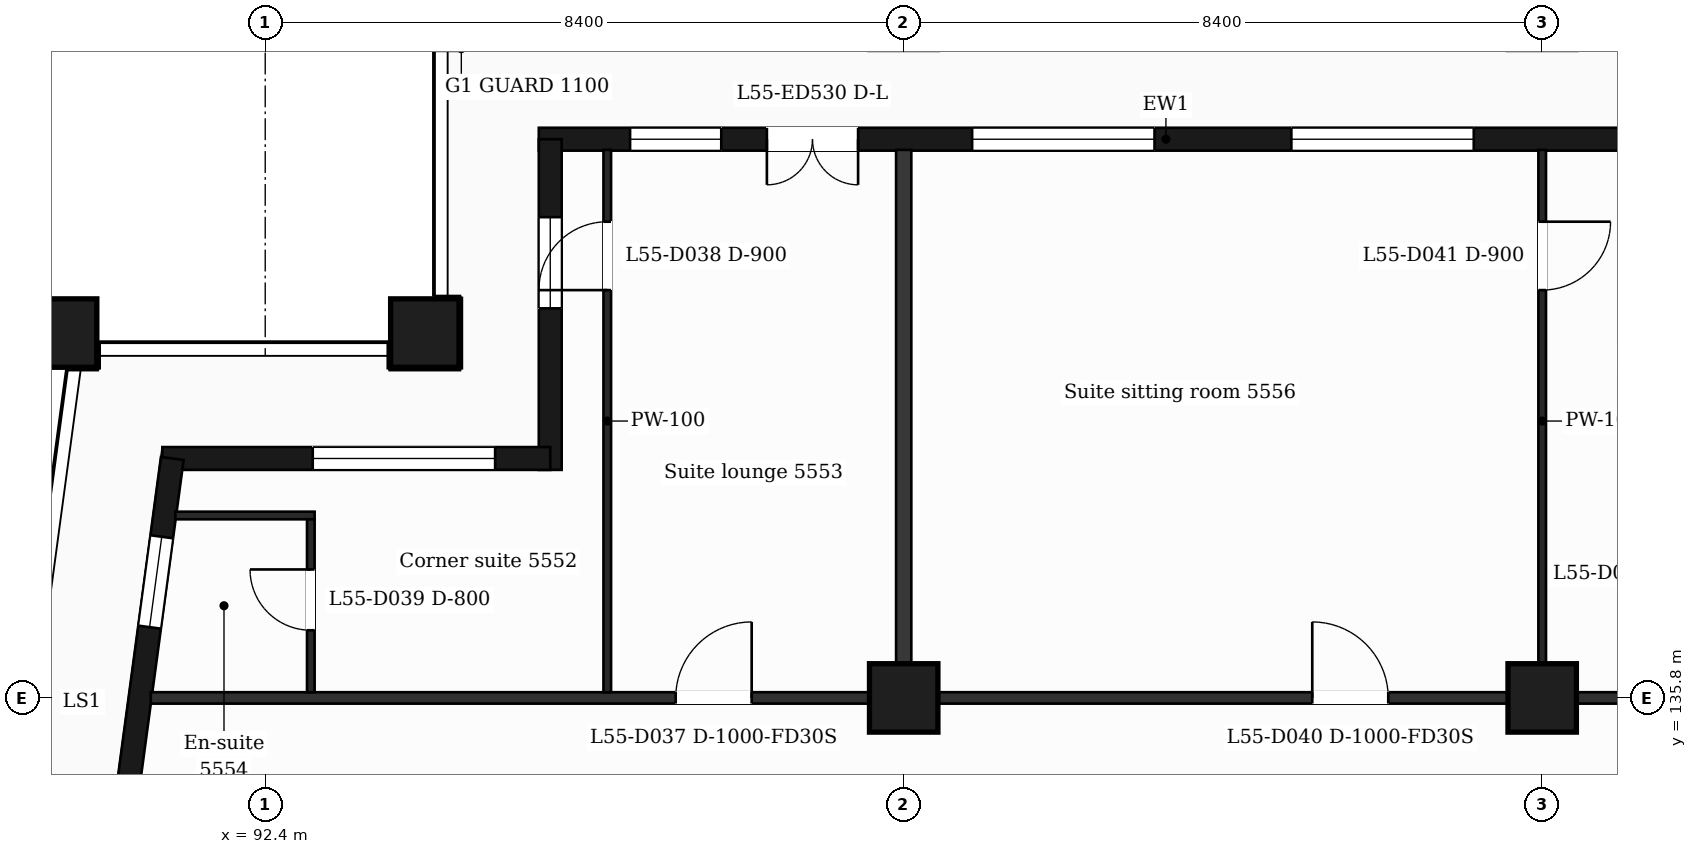
"""IFC4 building model, lengths in metres.
Left out: names, types, materials, properties, quantities, classifications, styles, units other than length and angle.
Written with IfcOpenShell. Run it as: python <this file> out.ifc"""

import sys

from ifc_helpers import new_model, si_unit, direction, frame, frame_2d, origin, origin_2d, place, context, subcontext, project, spatial, rectangle, extrude, element, fill, save


model = new_model("IFC4")
c1 = context("Model", 3, precision=1e-05, world=origin(), true_north=direction((0.0, 1.0)))
c2 = subcontext(c1, "Body", "Model", "MODEL_VIEW")
j1 = project(units=[si_unit("LENGTHUNIT", "METRE"), si_unit("PLANEANGLEUNIT", "RADIAN")], contexts=[c1])
p1 = place(None, origin())
s1 = spatial("IfcSite", under=j1, at=p1, CompositionType="ELEMENT")
p2 = place(p1, origin())
s2 = spatial("IfcBuilding", under=s1, at=p2, CompositionType="ELEMENT")
p3 = place(p2, frame((0.0, 0.0, 228.1)))
s3 = spatial("IfcBuildingStorey", under=s2, at=p3, CompositionType="ELEMENT", Elevation=228.1)
for number, where, z_axis, x_axis in (
    (1, (94.5, 140.6, 0.0), (0.0, 0.0, 1.0), (1.0, 0.0, 0.0)),
    (2, (89.735, 140.6, 0.0), (0.0, 0.0, 1.0), (1.0, 0.0, 0.0)),
    (3, (100.8, 135.8, 0.0), (0.0, 0.0, 1.0), (1.0, 0.0, 0.0)),
    (4, (109.2, 135.8, 0.0), (0.0, 0.0, 1.0), (1.0, 0.0, 0.0)),
):
    element("IfcColumn", number, at=place(p3, frame(where, z_axis=z_axis, x_axis=x_axis)), inside=s3, PredefinedType="COLUMN", context=c2, shape_type="SweptSolid", body=[
        extrude(rectangle(XDim=0.9, YDim=0.9, at=origin_2d()), origin(), (0.0, 0.0, 1.0), 3.7),
    ])
p4 = place(p3, frame((112.5, 143.15, 0.0), z_axis=(0.0, 0.0, 1.0), x_axis=(-1.0, 0.0, 0.0)))
e5 = element("IfcWall", 5, at=p4, inside=s3, PredefinedType="SOLIDWALL", context=c2, shape_type="SweptSolid", body=[
    extrude(rectangle(XDim=16.5, YDim=0.3, at=frame_2d((8.25, 0.0))), origin(), (0.0, 0.0, 1.0), 3.38),
])
p5 = place(p4, frame((1.1, 0.0, 0.9)))
e6 = element("IfcOpeningElement", 6, at=p5, cuts=e5, PredefinedType="OPENING", context=c2, shape_type="SweptSolid", body=[
    extrude(rectangle(XDim=1.2, YDim=2.1, at=frame_2d((0.6, 1.05))), frame((0.0, 0.16, 0.0), z_axis=(0.0, -1.0, 0.0), x_axis=(1.0, 0.0, 0.0)), (0.0, 0.0, 1.0), 0.32),
])
p6 = place(p4, frame((4.2, 0.0, 0.9)))
e7 = element("IfcOpeningElement", 7, at=p6, cuts=e5, PredefinedType="OPENING", context=c2, shape_type="SweptSolid", body=[
    extrude(rectangle(XDim=2.4, YDim=2.1, at=frame_2d((1.2, 1.05))), frame((0.0, 0.16, 0.0), z_axis=(0.0, -1.0, 0.0), x_axis=(1.0, 0.0, 0.0)), (0.0, 0.0, 1.0), 0.32),
])
p7 = place(p4, frame((8.4, 0.0, 0.9)))
e8 = element("IfcOpeningElement", 8, at=p7, cuts=e5, PredefinedType="OPENING", context=c2, shape_type="SweptSolid", body=[
    extrude(rectangle(XDim=2.4, YDim=2.1, at=frame_2d((1.2, 1.05))), frame((0.0, 0.16, 0.0), z_axis=(0.0, -1.0, 0.0), x_axis=(1.0, 0.0, 0.0)), (0.0, 0.0, 1.0), 0.32),
])
p8 = place(p4, frame((12.3, 0.0, 0.0)))
e9 = element("IfcOpeningElement", 9, at=p8, cuts=e5, PredefinedType="OPENING", context=c2, shape_type="SweptSolid", body=[
    extrude(rectangle(XDim=1.2, YDim=2.4, at=frame_2d((0.6, 1.2))), frame((0.0, 0.16, 0.0), z_axis=(0.0, -1.0, 0.0), x_axis=(1.0, 0.0, 0.0)), (0.0, 0.0, 1.0), 0.32),
])
p9 = place(p4, frame((14.1, 0.0, 0.9)))
e10 = element("IfcOpeningElement", 10, at=p9, cuts=e5, PredefinedType="OPENING", context=c2, shape_type="SweptSolid", body=[
    extrude(rectangle(XDim=1.2, YDim=2.1, at=frame_2d((0.6, 1.05))), frame((0.0, 0.16, 0.0), z_axis=(0.0, -1.0, 0.0), x_axis=(1.0, 0.0, 0.0)), (0.0, 0.0, 1.0), 0.32),
])
p10 = place(p3, frame((96.15, 143.15, 0.0), z_axis=(0.0, 0.0, 1.0), x_axis=(0.0, -1.0, 0.0)))
e11 = element("IfcWall", 11, at=p10, inside=s3, PredefinedType="SOLIDWALL", context=c2, shape_type="SweptSolid", body=[
    extrude(rectangle(XDim=4.35, YDim=0.3, at=frame_2d((2.175, 0.0))), origin(), (0.0, 0.0, 1.0), 3.38),
])
p11 = place(p10, frame((1.025, 0.0, 0.9)))
e12 = element("IfcOpeningElement", 12, at=p11, cuts=e11, PredefinedType="OPENING", context=c2, shape_type="SweptSolid", body=[
    extrude(rectangle(XDim=1.2, YDim=2.1, at=frame_2d((0.6, 1.05))), frame((0.0, 0.16, 0.0), z_axis=(0.0, -1.0, 0.0), x_axis=(1.0, 0.0, 0.0)), (0.0, 0.0, 1.0), 0.32),
])
p12 = place(p3, frame((96.15, 138.95, 0.0), z_axis=(0.0, 0.0, 1.0), x_axis=(-1.0, 0.0, 0.0)))
e13 = element("IfcWall", 13, at=p12, inside=s3, PredefinedType="SOLIDWALL", context=c2, shape_type="SweptSolid", body=[
    extrude(rectangle(XDim=5.104, YDim=0.3, at=frame_2d((2.552, 0.0))), origin(), (0.0, 0.0, 1.0), 3.38),
])
p13 = place(p12, frame((0.725, 0.0, 0.9)))
e14 = element("IfcOpeningElement", 14, at=p13, cuts=e13, PredefinedType="OPENING", context=c2, shape_type="SweptSolid", body=[
    extrude(rectangle(XDim=2.4, YDim=2.1, at=frame_2d((1.2, 1.05))), frame((0.0, 0.16, 0.0), z_axis=(0.0, -1.0, 0.0), x_axis=(1.0, 0.0, 0.0)), (0.0, 0.0, 1.0), 0.32),
])
p14 = place(p3, frame((91.177, 138.95, 0.0), z_axis=(0.0, 0.0, 1.0), x_axis=(-0.133426664613, -0.991058689065, 0.0)))
e15 = element("IfcWall", 15, at=p14, inside=s3, PredefinedType="SOLIDWALL", context=c2, shape_type="SweptSolid", body=[
    extrude(rectangle(XDim=6.609, YDim=0.3, at=frame_2d((3.305, 0.0))), origin(), (0.0, 0.0, 1.0), 3.38),
])
p15 = place(p14, frame((1.039, 0.0, 0.9)))
e16 = element("IfcOpeningElement", 16, at=p15, cuts=e15, PredefinedType="OPENING", context=c2, shape_type="SweptSolid", body=[
    extrude(rectangle(XDim=1.2, YDim=2.1, at=frame_2d((0.6, 1.05))), frame((0.0, 0.16, 0.0), z_axis=(0.0, -1.0, 0.0), x_axis=(1.0, 0.0, 0.0)), (0.0, 0.0, 1.0), 0.32),
])
p16 = place(p14, frame((4.294, 0.0, 0.0)))
e17 = element("IfcOpeningElement", 17, at=p16, cuts=e15, PredefinedType="OPENING", context=c2, shape_type="SweptSolid", body=[
    extrude(rectangle(XDim=1.2, YDim=2.4, at=frame_2d((0.6, 1.2))), frame((0.0, 0.16, 0.0), z_axis=(0.0, -1.0, 0.0), x_axis=(1.0, 0.0, 0.0)), (0.0, 0.0, 1.0), 0.32),
])
p17 = place(p3, frame((90.895, 135.8, 0.0), z_axis=(0.0, 0.0, 1.0), x_axis=(1.0, 0.0, 0.0)))
e18 = element("IfcWall", 18, at=p17, inside=s3, PredefinedType="PARTITIONING", context=c2, shape_type="SweptSolid", body=[
    extrude(rectangle(XDim=45.011, YDim=0.15, at=frame_2d((22.505, 0.0))), origin(), (0.0, 0.0, 1.0), 3.38),
])
p18 = place(p17, frame((6.906, 0.0, 0.0)))
e19 = element("IfcOpeningElement", 19, at=p18, cuts=e18, PredefinedType="OPENING", context=c2, shape_type="SweptSolid", body=[
    extrude(rectangle(XDim=1.0, YDim=2.1, at=frame_2d((0.5, 1.05))), frame((0.0, 0.085, 0.0), z_axis=(0.0, -1.0, 0.0), x_axis=(1.0, 0.0, 0.0)), (0.0, 0.0, 1.0), 0.17),
])
p19 = place(p17, frame((15.281, 0.0, 0.0)))
e20 = element("IfcOpeningElement", 20, at=p19, cuts=e18, PredefinedType="OPENING", context=c2, shape_type="SweptSolid", body=[
    extrude(rectangle(XDim=1.0, YDim=2.1, at=frame_2d((0.5, 1.05))), frame((0.0, 0.085, 0.0), z_axis=(0.0, -1.0, 0.0), x_axis=(1.0, 0.0, 0.0)), (0.0, 0.0, 1.0), 0.17),
])
p20 = place(p17, frame((25.045, 0.0, 0.0)))
e21 = element("IfcOpeningElement", 21, at=p20, cuts=e18, PredefinedType="OPENING", context=c2, shape_type="SweptSolid", body=[
    extrude(rectangle(XDim=1.0, YDim=2.1, at=frame_2d((0.5, 1.05))), frame((0.0, 0.085, 0.0), z_axis=(0.0, -1.0, 0.0), x_axis=(1.0, 0.0, 0.0)), (0.0, 0.0, 1.0), 0.17),
])
p21 = place(p17, frame((29.531, 0.0, 0.0)))
e22 = element("IfcOpeningElement", 22, at=p21, cuts=e18, PredefinedType="OPENING", context=c2, shape_type="SweptSolid", body=[
    extrude(rectangle(XDim=0.95, YDim=2.1, at=frame_2d((0.475, 1.05))), frame((0.0, 0.085, 0.0), z_axis=(0.0, -1.0, 0.0), x_axis=(1.0, 0.0, 0.0)), (0.0, 0.0, 1.0), 0.17),
])
p22 = place(p17, frame((39.814, 0.0, 0.0)))
e23 = element("IfcOpeningElement", 23, at=p22, cuts=e18, PredefinedType="OPENING", context=c2, shape_type="SweptSolid", body=[
    extrude(rectangle(XDim=0.95, YDim=2.1, at=frame_2d((0.475, 1.05))), frame((0.0, 0.085, 0.0), z_axis=(0.0, -1.0, 0.0), x_axis=(1.0, 0.0, 0.0)), (0.0, 0.0, 1.0), 0.17),
])
p23 = place(p3, frame((91.218, 138.2, 0.0), z_axis=(0.0, 0.0, 1.0), x_axis=(1.0, 0.0, 0.0)))
e24 = element("IfcWall", 24, at=p23, inside=s3, PredefinedType="PARTITIONING", context=c2, shape_type="SweptSolid", body=[
    extrude(rectangle(XDim=1.832, YDim=0.1, at=frame_2d((0.916, 0.0))), origin(), (0.0, 0.0, 1.0), 3.38),
])
p24 = place(p3, frame((93.0, 135.875, 0.0), z_axis=(0.0, 0.0, 1.0), x_axis=(0.0, 1.0, 0.0)))
e25 = element("IfcWall", 25, at=p24, inside=s3, PredefinedType="PARTITIONING", context=c2, shape_type="SweptSolid", body=[
    extrude(rectangle(XDim=2.275, YDim=0.1, at=frame_2d((1.137, 0.0))), origin(), (0.0, 0.0, 1.0), 3.38),
])
p25 = place(p24, frame((0.815, 0.0, 0.0)))
e26 = element("IfcOpeningElement", 26, at=p25, cuts=e25, PredefinedType="OPENING", context=c2, shape_type="SweptSolid", body=[
    extrude(rectangle(XDim=0.8, YDim=2.1, at=frame_2d((0.4, 1.05))), frame((0.0, 0.06, 0.0), z_axis=(0.0, -1.0, 0.0), x_axis=(1.0, 0.0, 0.0)), (0.0, 0.0, 1.0), 0.12),
])
p26 = place(p3, frame((96.9, 135.875, 0.0), z_axis=(0.0, 0.0, 1.0), x_axis=(0.0, 1.0, 0.0)))
e27 = element("IfcWall", 27, at=p26, inside=s3, PredefinedType="PARTITIONING", context=c2, shape_type="SweptSolid", body=[
    extrude(rectangle(XDim=7.135, YDim=0.1, at=frame_2d((3.567, 0.0))), origin(), (0.0, 0.0, 1.0), 3.38),
])
p27 = place(p26, frame((5.29, 0.0, 0.0)))
e28 = element("IfcOpeningElement", 28, at=p27, cuts=e27, PredefinedType="OPENING", context=c2, shape_type="SweptSolid", body=[
    extrude(rectangle(XDim=0.9, YDim=2.1, at=frame_2d((0.45, 1.05))), frame((0.0, 0.06, 0.0), z_axis=(0.0, -1.0, 0.0), x_axis=(1.0, 0.0, 0.0)), (0.0, 0.0, 1.0), 0.12),
])
p28 = place(p3, frame((100.8, 135.875, 0.0), z_axis=(0.0, 0.0, 1.0), x_axis=(0.0, 1.0, 0.0)))
e29 = element("IfcWall", 29, at=p28, inside=s3, PredefinedType="PARTITIONING", context=c2, shape_type="SweptSolid", body=[
    extrude(rectangle(XDim=7.135, YDim=0.2, at=frame_2d((3.567, 0.0))), origin(), (0.0, 0.0, 1.0), 3.38),
])
p29 = place(p3, frame((109.2, 135.875, 0.0), z_axis=(0.0, 0.0, 1.0), x_axis=(0.0, 1.0, 0.0)))
e30 = element("IfcWall", 30, at=p29, inside=s3, PredefinedType="PARTITIONING", context=c2, shape_type="SweptSolid", body=[
    extrude(rectangle(XDim=7.135, YDim=0.1, at=frame_2d((3.567, 0.0))), origin(), (0.0, 0.0, 1.0), 3.38),
])
p30 = place(p29, frame((5.29, 0.0, 0.0)))
e31 = element("IfcOpeningElement", 31, at=p30, cuts=e30, PredefinedType="OPENING", context=c2, shape_type="SweptSolid", body=[
    extrude(rectangle(XDim=0.9, YDim=2.1, at=frame_2d((0.45, 1.05))), frame((0.0, 0.06, 0.0), z_axis=(0.0, -1.0, 0.0), x_axis=(1.0, 0.0, 0.0)), (0.0, 0.0, 1.0), 0.12),
])
p31 = place(p5, origin())
e32 = element("IfcWindow", 32, at=p31, inside=s3, PartitioningType="SINGLE_PANEL", PredefinedType="WINDOW", context=c2, shape_type="SweptSolid", body=[
    extrude(rectangle(XDim=1.2, YDim=2.1, at=frame_2d((0.6, 1.05))), frame((0.0, 0.03, 0.0), z_axis=(0.0, -1.0, 0.0), x_axis=(1.0, 0.0, 0.0)), (0.0, 0.0, 1.0), 0.06),
])
fill(e6, e32)
p32 = place(p6, origin())
e33 = element("IfcWindow", 33, at=p32, inside=s3, PartitioningType="SINGLE_PANEL", PredefinedType="WINDOW", context=c2, shape_type="SweptSolid", body=[
    extrude(rectangle(XDim=2.4, YDim=2.1, at=frame_2d((1.2, 1.05))), frame((0.0, 0.03, 0.0), z_axis=(0.0, -1.0, 0.0), x_axis=(1.0, 0.0, 0.0)), (0.0, 0.0, 1.0), 0.06),
])
fill(e7, e33)
p33 = place(p7, origin())
e34 = element("IfcWindow", 34, at=p33, inside=s3, PartitioningType="SINGLE_PANEL", PredefinedType="WINDOW", context=c2, shape_type="SweptSolid", body=[
    extrude(rectangle(XDim=2.4, YDim=2.1, at=frame_2d((1.2, 1.05))), frame((0.0, 0.03, 0.0), z_axis=(0.0, -1.0, 0.0), x_axis=(1.0, 0.0, 0.0)), (0.0, 0.0, 1.0), 0.06),
])
fill(e8, e34)
p34 = place(p8, origin())
e35 = element("IfcDoor", 35, at=p34, inside=s3, OperationType="DOUBLE_DOOR_SINGLE_SWING", PredefinedType="DOOR", context=c2, shape_type="SweptSolid", body=[
    extrude(rectangle(XDim=1.2, YDim=2.4, at=frame_2d((0.6, 1.2))), frame((0.0, 0.025, 0.0), z_axis=(0.0, -1.0, 0.0), x_axis=(1.0, 0.0, 0.0)), (0.0, 0.0, 1.0), 0.05),
])
fill(e9, e35)
p35 = place(p9, origin())
e36 = element("IfcWindow", 36, at=p35, inside=s3, PartitioningType="SINGLE_PANEL", PredefinedType="WINDOW", context=c2, shape_type="SweptSolid", body=[
    extrude(rectangle(XDim=1.2, YDim=2.1, at=frame_2d((0.6, 1.05))), frame((0.0, 0.03, 0.0), z_axis=(0.0, -1.0, 0.0), x_axis=(1.0, 0.0, 0.0)), (0.0, 0.0, 1.0), 0.06),
])
fill(e10, e36)
p36 = place(p11, origin())
e37 = element("IfcWindow", 37, at=p36, inside=s3, PartitioningType="SINGLE_PANEL", PredefinedType="WINDOW", context=c2, shape_type="SweptSolid", body=[
    extrude(rectangle(XDim=1.2, YDim=2.1, at=frame_2d((0.6, 1.05))), frame((0.0, 0.03, 0.0), z_axis=(0.0, -1.0, 0.0), x_axis=(1.0, 0.0, 0.0)), (0.0, 0.0, 1.0), 0.06),
])
fill(e12, e37)
p37 = place(p13, origin())
e38 = element("IfcWindow", 38, at=p37, inside=s3, PartitioningType="SINGLE_PANEL", PredefinedType="WINDOW", context=c2, shape_type="SweptSolid", body=[
    extrude(rectangle(XDim=2.4, YDim=2.1, at=frame_2d((1.2, 1.05))), frame((0.0, 0.03, 0.0), z_axis=(0.0, -1.0, 0.0), x_axis=(1.0, 0.0, 0.0)), (0.0, 0.0, 1.0), 0.06),
])
fill(e14, e38)
p38 = place(p15, origin())
e39 = element("IfcWindow", 39, at=p38, inside=s3, PartitioningType="SINGLE_PANEL", PredefinedType="WINDOW", context=c2, shape_type="SweptSolid", body=[
    extrude(rectangle(XDim=1.2, YDim=2.1, at=frame_2d((0.6, 1.05))), frame((0.0, 0.03, 0.0), z_axis=(0.0, -1.0, 0.0), x_axis=(1.0, 0.0, 0.0)), (0.0, 0.0, 1.0), 0.06),
])
fill(e16, e39)
p39 = place(p18, origin())
e40 = element("IfcDoor", 40, at=p39, inside=s3, OperationType="SINGLE_SWING_RIGHT", PredefinedType="DOOR", context=c2, shape_type="SweptSolid", body=[
    extrude(rectangle(XDim=1.0, YDim=2.1, at=frame_2d((0.5, 1.05))), frame((0.0, 0.025, 0.0), z_axis=(0.0, -1.0, 0.0), x_axis=(1.0, 0.0, 0.0)), (0.0, 0.0, 1.0), 0.05),
])
fill(e19, e40)
p40 = place(p27, origin())
e41 = element("IfcDoor", 41, at=p40, inside=s3, OperationType="SINGLE_SWING_LEFT", PredefinedType="DOOR", context=c2, shape_type="SweptSolid", body=[
    extrude(rectangle(XDim=0.9, YDim=2.1, at=frame_2d((0.45, 1.05))), frame((0.0, 0.025, 0.0), z_axis=(0.0, -1.0, 0.0), x_axis=(1.0, 0.0, 0.0)), (0.0, 0.0, 1.0), 0.05),
])
fill(e28, e41)
p41 = place(p25, origin())
e42 = element("IfcDoor", 42, at=p41, inside=s3, OperationType="SINGLE_SWING_RIGHT", PredefinedType="DOOR", context=c2, shape_type="SweptSolid", body=[
    extrude(rectangle(XDim=0.8, YDim=2.1, at=frame_2d((0.4, 1.05))), frame((0.0, 0.025, 0.0), z_axis=(0.0, -1.0, 0.0), x_axis=(1.0, 0.0, 0.0)), (0.0, 0.0, 1.0), 0.05),
])
fill(e26, e42)
p42 = place(p19, origin())
e43 = element("IfcDoor", 43, at=p42, inside=s3, OperationType="SINGLE_SWING_LEFT", PredefinedType="DOOR", context=c2, shape_type="SweptSolid", body=[
    extrude(rectangle(XDim=1.0, YDim=2.1, at=frame_2d((0.5, 1.05))), frame((0.0, 0.025, 0.0), z_axis=(0.0, -1.0, 0.0), x_axis=(1.0, 0.0, 0.0)), (0.0, 0.0, 1.0), 0.05),
])
fill(e20, e43)
p43 = place(p30, origin())
e44 = element("IfcDoor", 44, at=p43, inside=s3, OperationType="SINGLE_SWING_RIGHT", PredefinedType="DOOR", context=c2, shape_type="SweptSolid", body=[
    extrude(rectangle(XDim=0.9, YDim=2.1, at=frame_2d((0.45, 1.05))), frame((0.0, 0.025, 0.0), z_axis=(0.0, -1.0, 0.0), x_axis=(1.0, 0.0, 0.0)), (0.0, 0.0, 1.0), 0.05),
])
fill(e31, e44)
save(model, sys.argv[1])
